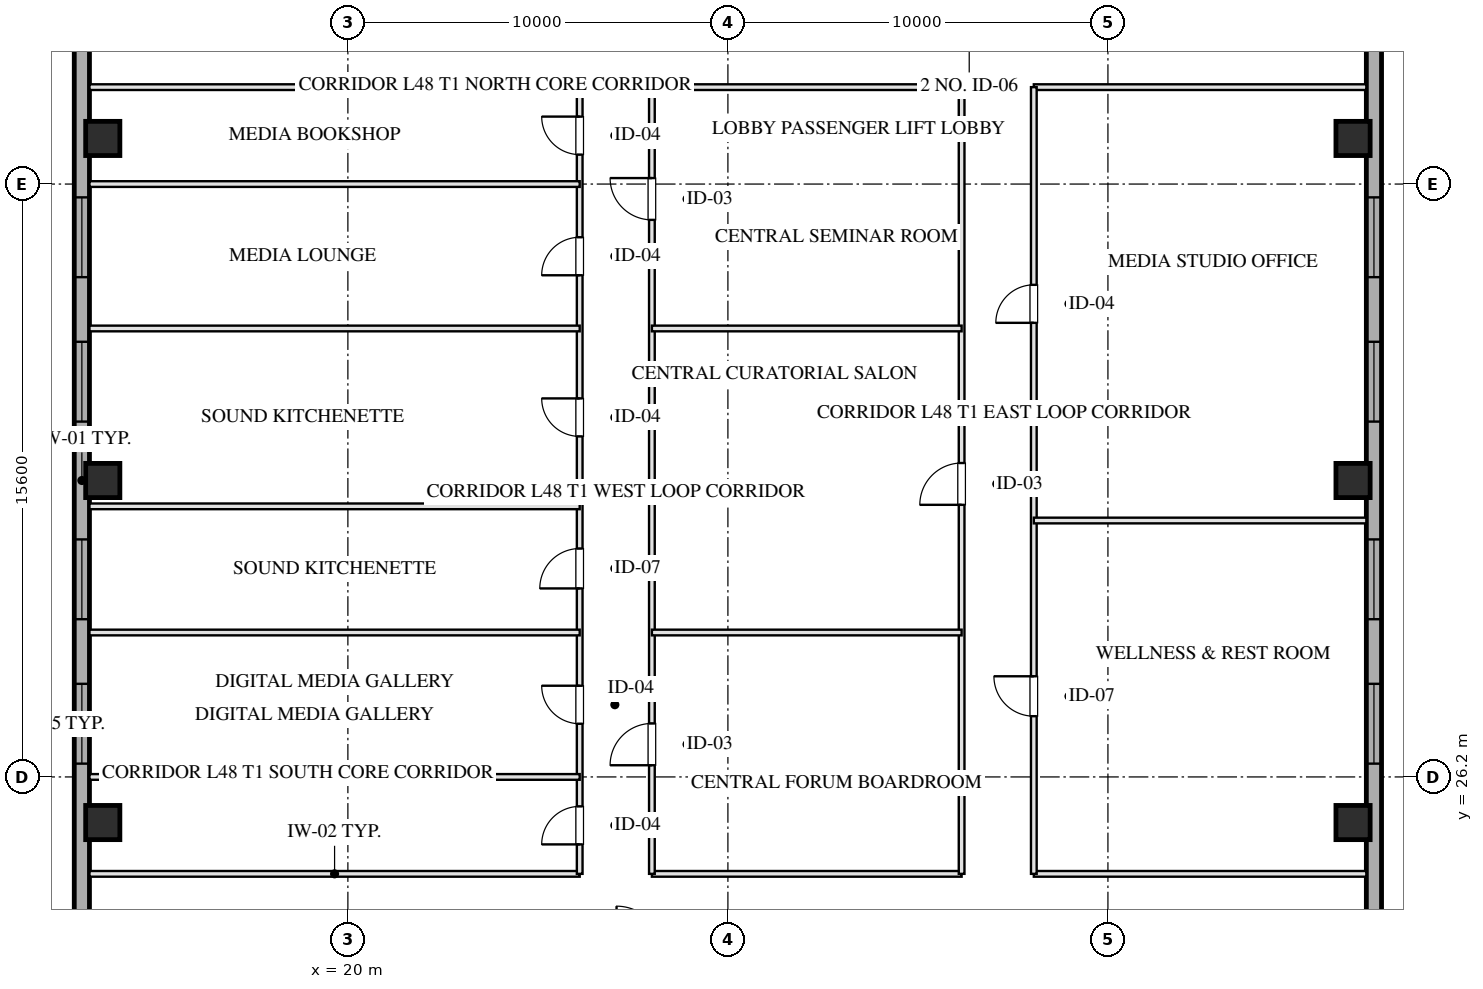
"""IFC4 building model, lengths in metres.
Left out: names, types, materials, properties, quantities, classifications, styles, units other than length and angle.
Written with IfcOpenShell. Run it as: python <this file> out.ifc"""

import sys

from ifc_helpers import new_model, si_unit, direction, frame, frame_2d, origin, origin_2d, place, context, subcontext, project, spatial, rectangle, hollow_rectangle, extrude, element, fill, save


model = new_model("IFC4")
c1 = context("Model", 3, precision=1e-05, world=origin(), true_north=direction((0.0, 1.0)))
c2 = subcontext(c1, "Body", "Model", "MODEL_VIEW")
j1 = project(units=[si_unit("LENGTHUNIT", "METRE"), si_unit("PLANEANGLEUNIT", "RADIAN")], contexts=[c1])
p1 = place(None, origin())
s1 = spatial("IfcSite", under=j1, at=p1, CompositionType="ELEMENT")
p2 = place(p1, origin())
s2 = spatial("IfcBuilding", under=s1, at=p2, CompositionType="ELEMENT")
p3 = place(p2, frame((0.0, 0.0, 180.55)))
s3 = spatial("IfcBuildingStorey", under=s2, at=p3, CompositionType="ELEMENT", Elevation=180.55)
for number, where, z_axis, x_axis in (
    (1, (13.55, 25.0, 0.0), (0.0, 0.0, 1.0), (1.0, 0.0, 0.0)),
    (2, (13.55, 34.0, 0.0), (0.0, 0.0, 1.0), (1.0, 0.0, 0.0)),
    (3, (13.55, 43.0, 0.0), (0.0, 0.0, 1.0), (1.0, 0.0, 0.0)),
    (4, (46.45, 25.0, 0.0), (0.0, 0.0, 1.0), (1.0, 0.0, 0.0)),
    (5, (46.45, 34.0, 0.0), (0.0, 0.0, 1.0), (1.0, 0.0, 0.0)),
    (6, (46.45, 43.0, 0.0), (0.0, 0.0, 1.0), (1.0, 0.0, 0.0)),
):
    element("IfcColumn", number, at=place(p3, frame(where, z_axis=z_axis, x_axis=x_axis)), inside=s3, PredefinedType="COLUMN", context=c2, shape_type="SweptSolid", body=[
        extrude(hollow_rectangle(XDim=0.9, YDim=0.9, WallThickness=0.032, at=origin_2d()), origin(), (0.0, 0.0, 1.0), 3.451),
    ])
p4 = place(p3, frame((13.0, 10.8, 0.0), z_axis=(0.0, 0.0, 1.0), x_axis=(0.0, 1.0, 0.0)))
e7 = element("IfcWall", 7, at=p4, inside=s3, PredefinedType="SOLIDWALL", context=c2, shape_type="SweptSolid", body=[
    extrude(rectangle(XDim=46.4, YDim=0.4, at=frame_2d((23.2, 0.0))), origin(), (0.0, 0.0, 1.0), 2.55),
])
p5 = place(p4, frame((15.75, 0.0, 0.75)))
e8 = element("IfcOpeningElement", 8, at=p5, cuts=e7, PredefinedType="OPENING", context=c2, shape_type="SweptSolid", body=[
    extrude(rectangle(XDim=2.1, YDim=1.4, at=frame_2d((1.05, 0.7))), frame((0.0, 0.21, 0.0), z_axis=(0.0, -1.0, 0.0), x_axis=(1.0, 0.0, 0.0)), (0.0, 0.0, 1.0), 0.42),
])
p6 = place(p4, frame((19.55, 0.0, 0.75)))
e9 = element("IfcOpeningElement", 9, at=p6, cuts=e7, PredefinedType="OPENING", context=c2, shape_type="SweptSolid", body=[
    extrude(rectangle(XDim=2.1, YDim=1.4, at=frame_2d((1.05, 0.7))), frame((0.0, 0.21, 0.0), z_axis=(0.0, -1.0, 0.0), x_axis=(1.0, 0.0, 0.0)), (0.0, 0.0, 1.0), 0.42),
])
p7 = place(p4, frame((24.75, 0.0, 0.75)))
e10 = element("IfcOpeningElement", 10, at=p7, cuts=e7, PredefinedType="OPENING", context=c2, shape_type="SweptSolid", body=[
    extrude(rectangle(XDim=2.1, YDim=1.4, at=frame_2d((1.05, 0.7))), frame((0.0, 0.21, 0.0), z_axis=(0.0, -1.0, 0.0), x_axis=(1.0, 0.0, 0.0)), (0.0, 0.0, 1.0), 0.42),
])
p8 = place(p4, frame((28.55, 0.0, 0.75)))
e11 = element("IfcOpeningElement", 11, at=p8, cuts=e7, PredefinedType="OPENING", context=c2, shape_type="SweptSolid", body=[
    extrude(rectangle(XDim=2.1, YDim=1.4, at=frame_2d((1.05, 0.7))), frame((0.0, 0.21, 0.0), z_axis=(0.0, -1.0, 0.0), x_axis=(1.0, 0.0, 0.0)), (0.0, 0.0, 1.0), 0.42),
])
p9 = place(p3, frame((47.0, 57.2, 0.0), z_axis=(0.0, 0.0, 1.0), x_axis=(0.0, -1.0, 0.0)))
e12 = element("IfcWall", 12, at=p9, inside=s3, PredefinedType="SOLIDWALL", context=c2, shape_type="SweptSolid", body=[
    extrude(rectangle(XDim=46.4, YDim=0.4, at=frame_2d((23.2, 0.0))), origin(), (0.0, 0.0, 1.0), 2.55),
])
p10 = place(p9, frame((28.55, 0.0, 0.75)))
e13 = element("IfcOpeningElement", 13, at=p10, cuts=e12, PredefinedType="OPENING", context=c2, shape_type="SweptSolid", body=[
    extrude(rectangle(XDim=2.1, YDim=1.4, at=frame_2d((1.05, 0.7))), frame((0.0, 0.21, 0.0), z_axis=(0.0, -1.0, 0.0), x_axis=(1.0, 0.0, 0.0)), (0.0, 0.0, 1.0), 0.42),
])
p11 = place(p9, frame((24.75, 0.0, 0.75)))
e14 = element("IfcOpeningElement", 14, at=p11, cuts=e12, PredefinedType="OPENING", context=c2, shape_type="SweptSolid", body=[
    extrude(rectangle(XDim=2.1, YDim=1.4, at=frame_2d((1.05, 0.7))), frame((0.0, 0.21, 0.0), z_axis=(0.0, -1.0, 0.0), x_axis=(1.0, 0.0, 0.0)), (0.0, 0.0, 1.0), 0.42),
])
p12 = place(p9, frame((19.55, 0.0, 0.75)))
e15 = element("IfcOpeningElement", 15, at=p12, cuts=e12, PredefinedType="OPENING", context=c2, shape_type="SweptSolid", body=[
    extrude(rectangle(XDim=2.1, YDim=1.4, at=frame_2d((1.05, 0.7))), frame((0.0, 0.21, 0.0), z_axis=(0.0, -1.0, 0.0), x_axis=(1.0, 0.0, 0.0)), (0.0, 0.0, 1.0), 0.42),
])
p13 = place(p9, frame((15.75, 0.0, 0.75)))
e16 = element("IfcOpeningElement", 16, at=p13, cuts=e12, PredefinedType="OPENING", context=c2, shape_type="SweptSolid", body=[
    extrude(rectangle(XDim=2.1, YDim=1.4, at=frame_2d((1.05, 0.7))), frame((0.0, 0.21, 0.0), z_axis=(0.0, -1.0, 0.0), x_axis=(1.0, 0.0, 0.0)), (0.0, 0.0, 1.0), 0.42),
])
p14 = place(p3, frame((13.2, 23.65, 0.0), z_axis=(0.0, 0.0, 1.0), x_axis=(1.0, 0.0, 0.0)))
e17 = element("IfcWall", 17, at=p14, inside=s3, PredefinedType="PARTITIONING", context=c2, shape_type="SweptSolid", body=[
    extrude(rectangle(XDim=12.9, YDim=0.15, at=frame_2d((6.45, 0.0))), origin(), (0.0, 0.0, 1.0), 3.155),
])
p15 = place(p3, frame((28.0, 23.65, 0.0), z_axis=(0.0, 0.0, 1.0), x_axis=(1.0, 0.0, 0.0)))
e18 = element("IfcWall", 18, at=p15, inside=s3, PredefinedType="PARTITIONING", context=c2, shape_type="SweptSolid", body=[
    extrude(rectangle(XDim=8.15, YDim=0.15, at=frame_2d((4.075, 0.0))), origin(), (0.0, 0.0, 1.0), 3.155),
])
p16 = place(p3, frame((38.05, 23.65, 0.0), z_axis=(0.0, 0.0, 1.0), x_axis=(1.0, 0.0, 0.0)))
e19 = element("IfcWall", 19, at=p16, inside=s3, PredefinedType="PARTITIONING", context=c2, shape_type="SweptSolid", body=[
    extrude(rectangle(XDim=8.75, YDim=0.15, at=frame_2d((4.375, 0.0))), origin(), (0.0, 0.0, 1.0), 3.155),
])
p17 = place(p3, frame((13.2, 44.35, 0.0), z_axis=(0.0, 0.0, 1.0), x_axis=(1.0, 0.0, 0.0)))
e20 = element("IfcWall", 20, at=p17, inside=s3, PredefinedType="PARTITIONING", context=c2, shape_type="SweptSolid", body=[
    extrude(rectangle(XDim=12.9, YDim=0.15, at=frame_2d((6.45, 0.0))), origin(), (0.0, 0.0, 1.0), 3.155),
])
p18 = place(p3, frame((28.0, 44.35, 0.0), z_axis=(0.0, 0.0, 1.0), x_axis=(1.0, 0.0, 0.0)))
e21 = element("IfcWall", 21, at=p18, inside=s3, PredefinedType="PARTITIONING", context=c2, shape_type="SweptSolid", body=[
    extrude(rectangle(XDim=8.15, YDim=0.15, at=frame_2d((4.075, 0.0))), origin(), (0.0, 0.0, 1.0), 3.155),
])
p19 = place(p3, frame((38.05, 44.35, 0.0), z_axis=(0.0, 0.0, 1.0), x_axis=(1.0, 0.0, 0.0)))
e22 = element("IfcWall", 22, at=p19, inside=s3, PredefinedType="PARTITIONING", context=c2, shape_type="SweptSolid", body=[
    extrude(rectangle(XDim=8.75, YDim=0.15, at=frame_2d((4.375, 0.0))), origin(), (0.0, 0.0, 1.0), 3.155),
])
p20 = place(p3, frame((26.1, 23.65, 0.0), z_axis=(0.0, 0.0, 1.0), x_axis=(0.0, 1.0, 0.0)))
e23 = element("IfcWall", 23, at=p20, inside=s3, PredefinedType="PARTITIONING", context=c2, shape_type="SweptSolid", body=[
    extrude(rectangle(XDim=20.7, YDim=0.15, at=frame_2d((10.35, 0.0))), origin(), (0.0, 0.0, 1.0), 3.155),
])
p21 = place(p20, frame((0.775, 0.0, 0.0)))
e24 = element("IfcOpeningElement", 24, at=p21, cuts=e23, PredefinedType="OPENING", context=c2, shape_type="SweptSolid", body=[
    extrude(rectangle(XDim=1.0, YDim=2.05, at=frame_2d((0.5, 1.025))), frame((0.0, 0.085, 0.0), z_axis=(0.0, -1.0, 0.0), x_axis=(1.0, 0.0, 0.0)), (0.0, 0.0, 1.0), 0.17),
])
p22 = place(p20, frame((3.95, 0.0, 0.0)))
e25 = element("IfcOpeningElement", 25, at=p22, cuts=e23, PredefinedType="OPENING", context=c2, shape_type="SweptSolid", body=[
    extrude(rectangle(XDim=1.0, YDim=2.05, at=frame_2d((0.5, 1.025))), frame((0.0, 0.085, 0.0), z_axis=(0.0, -1.0, 0.0), x_axis=(1.0, 0.0, 0.0)), (0.0, 0.0, 1.0), 0.17),
])
p23 = place(p20, frame((7.51, 0.0, 0.0)))
e26 = element("IfcOpeningElement", 26, at=p23, cuts=e23, PredefinedType="OPENING", context=c2, shape_type="SweptSolid", body=[
    extrude(rectangle(XDim=1.05, YDim=2.05, at=frame_2d((0.525, 1.025))), frame((0.0, 0.085, 0.0), z_axis=(0.0, -1.0, 0.0), x_axis=(1.0, 0.0, 0.0)), (0.0, 0.0, 1.0), 0.17),
])
p24 = place(p20, frame((11.51, 0.0, 0.0)))
e27 = element("IfcOpeningElement", 27, at=p24, cuts=e23, PredefinedType="OPENING", context=c2, shape_type="SweptSolid", body=[
    extrude(rectangle(XDim=1.0, YDim=2.05, at=frame_2d((0.5, 1.025))), frame((0.0, 0.085, 0.0), z_axis=(0.0, -1.0, 0.0), x_axis=(1.0, 0.0, 0.0)), (0.0, 0.0, 1.0), 0.17),
])
p25 = place(p20, frame((15.75, 0.0, 0.0)))
e28 = element("IfcOpeningElement", 28, at=p25, cuts=e23, PredefinedType="OPENING", context=c2, shape_type="SweptSolid", body=[
    extrude(rectangle(XDim=1.0, YDim=2.05, at=frame_2d((0.5, 1.025))), frame((0.0, 0.085, 0.0), z_axis=(0.0, -1.0, 0.0), x_axis=(1.0, 0.0, 0.0)), (0.0, 0.0, 1.0), 0.17),
])
p26 = place(p20, frame((18.925, 0.0, 0.0)))
e29 = element("IfcOpeningElement", 29, at=p26, cuts=e23, PredefinedType="OPENING", context=c2, shape_type="SweptSolid", body=[
    extrude(rectangle(XDim=1.0, YDim=2.05, at=frame_2d((0.5, 1.025))), frame((0.0, 0.085, 0.0), z_axis=(0.0, -1.0, 0.0), x_axis=(1.0, 0.0, 0.0)), (0.0, 0.0, 1.0), 0.17),
])
p27 = place(p3, frame((28.0, 23.65, 0.0), z_axis=(0.0, 0.0, 1.0), x_axis=(0.0, 1.0, 0.0)))
e30 = element("IfcWall", 30, at=p27, inside=s3, PredefinedType="PARTITIONING", context=c2, shape_type="SweptSolid", body=[
    extrude(rectangle(XDim=20.7, YDim=0.15, at=frame_2d((10.35, 0.0))), origin(), (0.0, 0.0, 1.0), 3.155),
])
p28 = place(p27, frame((2.857, 0.0, 0.0)))
e31 = element("IfcOpeningElement", 31, at=p28, cuts=e30, PredefinedType="OPENING", context=c2, shape_type="SweptSolid", body=[
    extrude(rectangle(XDim=1.1, YDim=2.05, at=frame_2d((0.55, 1.025))), frame((0.0, 0.085, 0.0), z_axis=(0.0, -1.0, 0.0), x_axis=(1.0, 0.0, 0.0)), (0.0, 0.0, 1.0), 0.17),
])
p29 = place(p27, frame((17.208, 0.0, 0.0)))
e32 = element("IfcOpeningElement", 32, at=p29, cuts=e30, PredefinedType="OPENING", context=c2, shape_type="SweptSolid", body=[
    extrude(rectangle(XDim=1.1, YDim=2.05, at=frame_2d((0.55, 1.025))), frame((0.0, 0.085, 0.0), z_axis=(0.0, -1.0, 0.0), x_axis=(1.0, 0.0, 0.0)), (0.0, 0.0, 1.0), 0.17),
])
p30 = place(p3, frame((36.15, 23.65, 0.0), z_axis=(0.0, 0.0, 1.0), x_axis=(0.0, 1.0, 0.0)))
e33 = element("IfcWall", 33, at=p30, inside=s3, PredefinedType="PARTITIONING", context=c2, shape_type="SweptSolid", body=[
    extrude(rectangle(XDim=20.7, YDim=0.15, at=frame_2d((10.35, 0.0))), origin(), (0.0, 0.0, 1.0), 3.155),
])
p31 = place(p30, frame((9.71, 0.0, 0.0)))
e34 = element("IfcOpeningElement", 34, at=p31, cuts=e33, PredefinedType="OPENING", context=c2, shape_type="SweptSolid", body=[
    extrude(rectangle(XDim=1.1, YDim=2.05, at=frame_2d((0.55, 1.025))), frame((0.0, 0.085, 0.0), z_axis=(0.0, -1.0, 0.0), x_axis=(1.0, 0.0, 0.0)), (0.0, 0.0, 1.0), 0.17),
])
p32 = place(p3, frame((38.05, 23.65, 0.0), z_axis=(0.0, 0.0, 1.0), x_axis=(0.0, 1.0, 0.0)))
e35 = element("IfcWall", 35, at=p32, inside=s3, PredefinedType="PARTITIONING", context=c2, shape_type="SweptSolid", body=[
    extrude(rectangle(XDim=20.7, YDim=0.15, at=frame_2d((10.35, 0.0))), origin(), (0.0, 0.0, 1.0), 3.155),
])
p33 = place(p32, frame((4.148, 0.0, 0.0)))
e36 = element("IfcOpeningElement", 36, at=p33, cuts=e35, PredefinedType="OPENING", context=c2, shape_type="SweptSolid", body=[
    extrude(rectangle(XDim=1.05, YDim=2.05, at=frame_2d((0.525, 1.025))), frame((0.0, 0.085, 0.0), z_axis=(0.0, -1.0, 0.0), x_axis=(1.0, 0.0, 0.0)), (0.0, 0.0, 1.0), 0.17),
])
p34 = place(p32, frame((14.499, 0.0, 0.0)))
e37 = element("IfcOpeningElement", 37, at=p34, cuts=e35, PredefinedType="OPENING", context=c2, shape_type="SweptSolid", body=[
    extrude(rectangle(XDim=1.0, YDim=2.05, at=frame_2d((0.5, 1.025))), frame((0.0, 0.085, 0.0), z_axis=(0.0, -1.0, 0.0), x_axis=(1.0, 0.0, 0.0)), (0.0, 0.0, 1.0), 0.17),
])
for number, where, z_axis, x_axis in (
    (38, (28.0, 30.0, 0.0), (0.0, 0.0, 1.0), (1.0, 0.0, 0.0)),
    (39, (28.0, 38.0, 0.0), (0.0, 0.0, 1.0), (1.0, 0.0, 0.0)),
):
    element("IfcWall", number, at=place(p3, frame(where, z_axis=z_axis, x_axis=x_axis)), inside=s3, PredefinedType="PARTITIONING", context=c2, shape_type="SweptSolid", body=[
        extrude(rectangle(XDim=8.15, YDim=0.15, at=frame_2d((4.075, 0.0))), origin(), (0.0, 0.0, 1.0), 3.155),
    ])
for number, where, z_axis, x_axis in (
    (40, (13.2, 26.2, 0.0), (0.0, 0.0, 1.0), (1.0, 0.0, 0.0)),
    (41, (13.2, 30.0, 0.0), (0.0, 0.0, 1.0), (1.0, 0.0, 0.0)),
    (42, (13.2, 33.32, 0.0), (0.0, 0.0, 1.0), (1.0, 0.0, 0.0)),
    (43, (13.2, 38.0, 0.0), (0.0, 0.0, 1.0), (1.0, 0.0, 0.0)),
    (44, (13.2, 41.8, 0.0), (0.0, 0.0, 1.0), (1.0, 0.0, 0.0)),
):
    element("IfcWall", number, at=place(p3, frame(where, z_axis=z_axis, x_axis=x_axis)), inside=s3, PredefinedType="PARTITIONING", context=c2, shape_type="SweptSolid", body=[
        extrude(rectangle(XDim=12.9, YDim=0.15, at=frame_2d((6.45, 0.0))), origin(), (0.0, 0.0, 1.0), 3.155),
    ])
p35 = place(p3, frame((38.05, 32.947, 0.0), z_axis=(0.0, 0.0, 1.0), x_axis=(1.0, 0.0, 0.0)))
e45 = element("IfcWall", 45, at=p35, inside=s3, PredefinedType="PARTITIONING", context=c2, shape_type="SweptSolid", body=[
    extrude(rectangle(XDim=8.75, YDim=0.15, at=frame_2d((4.375, 0.0))), origin(), (0.0, 0.0, 1.0), 3.155),
])
p36 = place(p5, origin())
e46 = element("IfcWindow", 46, at=p36, inside=s3, PartitioningType="TRIPLE_PANEL_VERTICAL", PredefinedType="WINDOW", context=c2, shape_type="SweptSolid", body=[
    extrude(rectangle(XDim=2.1, YDim=1.4, at=frame_2d((1.05, 0.7))), frame((0.0, 0.03, 0.0), z_axis=(0.0, -1.0, 0.0), x_axis=(1.0, 0.0, 0.0)), (0.0, 0.0, 1.0), 0.06),
])
fill(e8, e46)
p37 = place(p6, origin())
e47 = element("IfcWindow", 47, at=p37, inside=s3, PartitioningType="TRIPLE_PANEL_VERTICAL", PredefinedType="WINDOW", context=c2, shape_type="SweptSolid", body=[
    extrude(rectangle(XDim=2.1, YDim=1.4, at=frame_2d((1.05, 0.7))), frame((0.0, 0.03, 0.0), z_axis=(0.0, -1.0, 0.0), x_axis=(1.0, 0.0, 0.0)), (0.0, 0.0, 1.0), 0.06),
])
fill(e9, e47)
p38 = place(p7, origin())
e48 = element("IfcWindow", 48, at=p38, inside=s3, PartitioningType="TRIPLE_PANEL_VERTICAL", PredefinedType="WINDOW", context=c2, shape_type="SweptSolid", body=[
    extrude(rectangle(XDim=2.1, YDim=1.4, at=frame_2d((1.05, 0.7))), frame((0.0, 0.03, 0.0), z_axis=(0.0, -1.0, 0.0), x_axis=(1.0, 0.0, 0.0)), (0.0, 0.0, 1.0), 0.06),
])
fill(e10, e48)
p39 = place(p8, origin())
e49 = element("IfcWindow", 49, at=p39, inside=s3, PartitioningType="TRIPLE_PANEL_VERTICAL", PredefinedType="WINDOW", context=c2, shape_type="SweptSolid", body=[
    extrude(rectangle(XDim=2.1, YDim=1.4, at=frame_2d((1.05, 0.7))), frame((0.0, 0.03, 0.0), z_axis=(0.0, -1.0, 0.0), x_axis=(1.0, 0.0, 0.0)), (0.0, 0.0, 1.0), 0.06),
])
fill(e11, e49)
p40 = place(p10, origin())
e50 = element("IfcWindow", 50, at=p40, inside=s3, PartitioningType="TRIPLE_PANEL_VERTICAL", PredefinedType="WINDOW", context=c2, shape_type="SweptSolid", body=[
    extrude(rectangle(XDim=2.1, YDim=1.4, at=frame_2d((1.05, 0.7))), frame((0.0, 0.03, 0.0), z_axis=(0.0, -1.0, 0.0), x_axis=(1.0, 0.0, 0.0)), (0.0, 0.0, 1.0), 0.06),
])
fill(e13, e50)
p41 = place(p11, origin())
e51 = element("IfcWindow", 51, at=p41, inside=s3, PartitioningType="TRIPLE_PANEL_VERTICAL", PredefinedType="WINDOW", context=c2, shape_type="SweptSolid", body=[
    extrude(rectangle(XDim=2.1, YDim=1.4, at=frame_2d((1.05, 0.7))), frame((0.0, 0.03, 0.0), z_axis=(0.0, -1.0, 0.0), x_axis=(1.0, 0.0, 0.0)), (0.0, 0.0, 1.0), 0.06),
])
fill(e14, e51)
p42 = place(p12, origin())
e52 = element("IfcWindow", 52, at=p42, inside=s3, PartitioningType="TRIPLE_PANEL_VERTICAL", PredefinedType="WINDOW", context=c2, shape_type="SweptSolid", body=[
    extrude(rectangle(XDim=2.1, YDim=1.4, at=frame_2d((1.05, 0.7))), frame((0.0, 0.03, 0.0), z_axis=(0.0, -1.0, 0.0), x_axis=(1.0, 0.0, 0.0)), (0.0, 0.0, 1.0), 0.06),
])
fill(e15, e52)
p43 = place(p13, origin())
e53 = element("IfcWindow", 53, at=p43, inside=s3, PartitioningType="TRIPLE_PANEL_VERTICAL", PredefinedType="WINDOW", context=c2, shape_type="SweptSolid", body=[
    extrude(rectangle(XDim=2.1, YDim=1.4, at=frame_2d((1.05, 0.7))), frame((0.0, 0.03, 0.0), z_axis=(0.0, -1.0, 0.0), x_axis=(1.0, 0.0, 0.0)), (0.0, 0.0, 1.0), 0.06),
])
fill(e16, e53)
p44 = place(p21, origin())
e54 = element("IfcDoor", 54, at=p44, inside=s3, OperationType="SINGLE_SWING_LEFT", PredefinedType="DOOR", context=c2, shape_type="SweptSolid", body=[
    extrude(rectangle(XDim=1.0, YDim=2.05, at=frame_2d((0.5, 1.025))), frame((0.0, 0.025, 0.0), z_axis=(0.0, -1.0, 0.0), x_axis=(1.0, 0.0, 0.0)), (0.0, 0.0, 1.0), 0.05),
])
fill(e24, e54)
p45 = place(p22, origin())
e55 = element("IfcDoor", 55, at=p45, inside=s3, OperationType="SINGLE_SWING_RIGHT", PredefinedType="DOOR", context=c2, shape_type="SweptSolid", body=[
    extrude(rectangle(XDim=1.0, YDim=2.05, at=frame_2d((0.5, 1.025))), frame((0.0, 0.025, 0.0), z_axis=(0.0, -1.0, 0.0), x_axis=(1.0, 0.0, 0.0)), (0.0, 0.0, 1.0), 0.05),
])
fill(e25, e55)
p46 = place(p23, origin())
e56 = element("IfcDoor", 56, at=p46, inside=s3, OperationType="SINGLE_SWING_LEFT", PredefinedType="DOOR", context=c2, shape_type="SweptSolid", body=[
    extrude(rectangle(XDim=1.05, YDim=2.05, at=frame_2d((0.525, 1.025))), frame((0.0, 0.025, 0.0), z_axis=(0.0, -1.0, 0.0), x_axis=(1.0, 0.0, 0.0)), (0.0, 0.0, 1.0), 0.05),
])
fill(e26, e56)
p47 = place(p24, origin())
e57 = element("IfcDoor", 57, at=p47, inside=s3, OperationType="SINGLE_SWING_RIGHT", PredefinedType="DOOR", context=c2, shape_type="SweptSolid", body=[
    extrude(rectangle(XDim=1.0, YDim=2.05, at=frame_2d((0.5, 1.025))), frame((0.0, 0.025, 0.0), z_axis=(0.0, -1.0, 0.0), x_axis=(1.0, 0.0, 0.0)), (0.0, 0.0, 1.0), 0.05),
])
fill(e27, e57)
p48 = place(p25, origin())
e58 = element("IfcDoor", 58, at=p48, inside=s3, OperationType="SINGLE_SWING_LEFT", PredefinedType="DOOR", context=c2, shape_type="SweptSolid", body=[
    extrude(rectangle(XDim=1.0, YDim=2.05, at=frame_2d((0.5, 1.025))), frame((0.0, 0.025, 0.0), z_axis=(0.0, -1.0, 0.0), x_axis=(1.0, 0.0, 0.0)), (0.0, 0.0, 1.0), 0.05),
])
fill(e28, e58)
p49 = place(p26, origin())
e59 = element("IfcDoor", 59, at=p49, inside=s3, OperationType="SINGLE_SWING_RIGHT", PredefinedType="DOOR", context=c2, shape_type="SweptSolid", body=[
    extrude(rectangle(XDim=1.0, YDim=2.05, at=frame_2d((0.5, 1.025))), frame((0.0, 0.025, 0.0), z_axis=(0.0, -1.0, 0.0), x_axis=(1.0, 0.0, 0.0)), (0.0, 0.0, 1.0), 0.05),
])
fill(e29, e59)
p50 = place(p28, origin())
e60 = element("IfcDoor", 60, at=p50, inside=s3, OperationType="SINGLE_SWING_LEFT", PredefinedType="DOOR", context=c2, shape_type="SweptSolid", body=[
    extrude(rectangle(XDim=1.1, YDim=2.05, at=frame_2d((0.55, 1.025))), frame((0.0, 0.025, 0.0), z_axis=(0.0, -1.0, 0.0), x_axis=(1.0, 0.0, 0.0)), (0.0, 0.0, 1.0), 0.05),
])
fill(e31, e60)
p51 = place(p29, origin())
e61 = element("IfcDoor", 61, at=p51, inside=s3, OperationType="SINGLE_SWING_RIGHT", PredefinedType="DOOR", context=c2, shape_type="SweptSolid", body=[
    extrude(rectangle(XDim=1.1, YDim=2.05, at=frame_2d((0.55, 1.025))), frame((0.0, 0.025, 0.0), z_axis=(0.0, -1.0, 0.0), x_axis=(1.0, 0.0, 0.0)), (0.0, 0.0, 1.0), 0.05),
])
fill(e32, e61)
p52 = place(p31, origin())
e62 = element("IfcDoor", 62, at=p52, inside=s3, OperationType="SINGLE_SWING_LEFT", PredefinedType="DOOR", context=c2, shape_type="SweptSolid", body=[
    extrude(rectangle(XDim=1.1, YDim=2.05, at=frame_2d((0.55, 1.025))), frame((0.0, 0.025, 0.0), z_axis=(0.0, -1.0, 0.0), x_axis=(1.0, 0.0, 0.0)), (0.0, 0.0, 1.0), 0.05),
])
fill(e34, e62)
p53 = place(p33, origin())
e63 = element("IfcDoor", 63, at=p53, inside=s3, OperationType="SINGLE_SWING_RIGHT", PredefinedType="DOOR", context=c2, shape_type="SweptSolid", body=[
    extrude(rectangle(XDim=1.05, YDim=2.05, at=frame_2d((0.525, 1.025))), frame((0.0, 0.025, 0.0), z_axis=(0.0, -1.0, 0.0), x_axis=(1.0, 0.0, 0.0)), (0.0, 0.0, 1.0), 0.05),
])
fill(e36, e63)
p54 = place(p34, origin())
e64 = element("IfcDoor", 64, at=p54, inside=s3, OperationType="SINGLE_SWING_LEFT", PredefinedType="DOOR", context=c2, shape_type="SweptSolid", body=[
    extrude(rectangle(XDim=1.0, YDim=2.05, at=frame_2d((0.5, 1.025))), frame((0.0, 0.025, 0.0), z_axis=(0.0, -1.0, 0.0), x_axis=(1.0, 0.0, 0.0)), (0.0, 0.0, 1.0), 0.05),
])
fill(e37, e64)
save(model, sys.argv[1])
